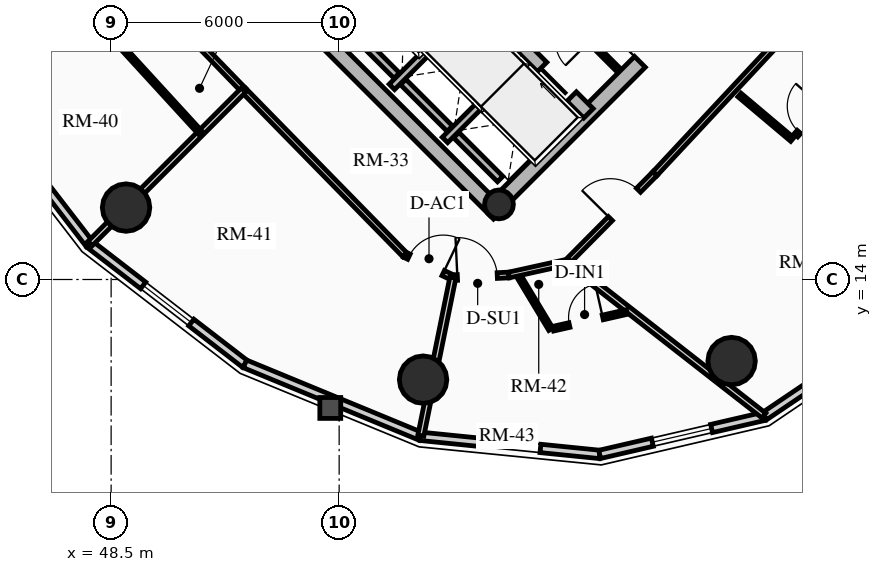
"""IFC4 building model, lengths in metres.
Left out: names, types, materials, properties, quantities, classifications, styles, units other than length and angle.
Written with IfcOpenShell. Run it as: python <this file> out.ifc"""

import sys

from ifc_helpers import new_model, si_unit, direction, frame, frame_2d, origin, origin_2d, place, context, subcontext, project, spatial, rectangle, circle, hollow_circle, extrude, source, transform, mapped, element, fill, save


model = new_model("IFC4")
c1 = context("Model", 3, precision=1e-05, world=origin(), true_north=direction((0.0, 1.0)))
c2 = subcontext(c1, "Body", "Model", "MODEL_VIEW")
j1 = project(units=[si_unit("LENGTHUNIT", "METRE"), si_unit("PLANEANGLEUNIT", "RADIAN")], contexts=[c1])
p1 = place(None, origin())
s1 = spatial("IfcSite", under=j1, at=p1, CompositionType="ELEMENT")
p2 = place(p1, origin())
s2 = spatial("IfcBuilding", under=s1, at=p2, CompositionType="ELEMENT")
p3 = place(p2, frame((0.0, 0.0, 180.7)))
s3 = spatial("IfcBuildingStorey", under=s2, at=p3, CompositionType="ELEMENT", Elevation=180.7)
p4 = place(p3, frame((58.702, 15.732, 0.0), z_axis=(0.0, 0.0, 1.0), x_axis=(-0.707106781187, 0.707106781187, 0.0)))
e1 = element("IfcWall", 1, at=p4, inside=s3, PredefinedType="SHEAR", context=c2, shape_type="SweptSolid", body=[
    extrude(rectangle(XDim=14.1, YDim=0.4, at=frame_2d((7.05, 0.0))), origin(), (0.0, 0.0, 1.0), 2.91),
])
p5 = place(p3, frame((58.561, 15.873, 0.0), z_axis=(0.0, 0.0, 1.0), x_axis=(0.707106781187, 0.707106781187, 0.0)))
e2 = element("IfcWall", 2, at=p5, inside=s3, PredefinedType="SHEAR", context=c2, shape_type="SweptSolid", body=[
    extrude(rectangle(XDim=10.7, YDim=0.4, at=frame_2d((5.35, 0.0))), origin(), (0.0, 0.0, 1.0), 2.91),
])
m1 = source(origin(), c2, "Body", "SweptSolid", [
    extrude(rectangle(XDim=1.5, YDim=2.02, at=frame_2d((0.75, 1.01))), frame((0.0, 0.21, 0.0), z_axis=(0.0, -1.0, 0.0), x_axis=(1.0, 0.0, 0.0)), (0.0, 0.0, 1.0), 0.42),
])
p6 = place(p5, frame((5.45, 0.0, 0.0)))
e3 = element("IfcOpeningElement", 3, at=p6, cuts=e2, PredefinedType="OPENING", context=c2, shape_type="MappedRepresentation", body=[
    mapped(m1, transform((0.0, 0.0, 0.0), x_axis=(1.0, 0.0, 0.0), y_axis=(0.0, 1.0, 0.0), z_axis=(0.0, 0.0, 1.0), scale=1.0)),
])
p7 = place(p3, frame((61.06, 18.373, 0.0), z_axis=(0.0, 0.0, 1.0), x_axis=(-0.707106781187, 0.707106781187, 0.0)))
e4 = element("IfcWall", 4, at=p7, inside=s3, PredefinedType="SHEAR", context=c2, shape_type="SweptSolid", body=[
    extrude(rectangle(XDim=13.7, YDim=0.35, at=frame_2d((6.85, 0.0))), origin(), (0.0, 0.0, 1.0), 2.91),
])
m2 = source(origin(), c2, "Body", "SweptSolid", [
    extrude(rectangle(XDim=1.1, YDim=2.015, at=frame_2d((0.55, 1.007))), frame((0.0, 0.185, 0.0), z_axis=(0.0, -1.0, 0.0), x_axis=(1.0, 0.0, 0.0)), (0.0, 0.0, 1.0), 0.37),
])
p8 = place(p7, frame((4.85, 0.0, 0.0)))
e5 = element("IfcOpeningElement", 5, at=p8, cuts=e4, PredefinedType="OPENING", context=c2, shape_type="MappedRepresentation", body=[
    mapped(m2, transform((0.0, 0.0, 0.0), x_axis=(1.0, 0.0, 0.0), y_axis=(0.0, 1.0, 0.0), z_axis=(0.0, 0.0, 1.0), scale=1.0)),
])
p9 = place(p7, frame((0.625, 0.0, 0.0)))
e6 = element("IfcOpeningElement", 6, at=p9, cuts=e4, PredefinedType="OPENING", context=c2, shape_type="MappedRepresentation", body=[
    mapped(m2, transform((0.0, 0.0, 0.0), x_axis=(1.0, 0.0, 0.0), y_axis=(0.0, 1.0, 0.0), z_axis=(0.0, 0.0, 1.0), scale=1.0)),
])
p10 = place(p7, frame((2.625, 0.0, 0.0)))
e7 = element("IfcOpeningElement", 7, at=p10, cuts=e4, PredefinedType="OPENING", context=c2, shape_type="MappedRepresentation", body=[
    mapped(m2, transform((0.0, 0.0, 0.0), x_axis=(1.0, 0.0, 0.0), y_axis=(0.0, 1.0, 0.0), z_axis=(0.0, 0.0, 1.0), scale=1.0)),
])
m3 = source(origin(), c2, "Body", "SweptSolid", [
    extrude(rectangle(XDim=1.15, YDim=2.02, at=frame_2d((0.575, 1.01))), frame((0.0, 0.185, 0.0), z_axis=(0.0, -1.0, 0.0), x_axis=(1.0, 0.0, 0.0)), (0.0, 0.0, 1.0), 0.37),
])
p11 = place(p7, frame((7.27, 0.0, 0.0)))
e8 = element("IfcOpeningElement", 8, at=p11, cuts=e4, PredefinedType="OPENING", context=c2, shape_type="MappedRepresentation", body=[
    mapped(m3, transform((0.0, 0.0, 0.0), x_axis=(1.0, 0.0, 0.0), y_axis=(0.0, 1.0, 0.0), z_axis=(0.0, 0.0, 1.0), scale=1.0)),
])
p12 = place(p3, frame((58.706, 15.976, 0.0), z_axis=(0.0, 0.0, 1.0), x_axis=(0.707106781187, 0.707106781187, 0.0)))
e9 = element("IfcColumn", 9, at=p12, inside=s3, PredefinedType="COLUMN", context=c2, shape_type="SweptSolid", body=[
    extrude(hollow_circle(Radius=0.38, WallThickness=0.032, at=origin_2d()), origin(), (0.0, 0.0, 1.0), 2.91),
])
for number, where, z_axis, x_axis in (
    (10, (48.893, 15.893, 0.0), (0.0, 0.0, 1.0), (1.0, 0.0, 0.0)),
    (11, (56.709, 11.365, 0.0), (0.0, 0.0, 1.0), (1.0, 0.0, 0.0)),
    (12, (64.827, 11.854, 0.0), (0.0, 0.0, 1.0), (1.0, 0.0, 0.0)),
):
    element("IfcColumn", number, at=place(p3, frame(where, z_axis=z_axis, x_axis=x_axis)), inside=s3, PredefinedType="USERDEFINED", context=c2, shape_type="SweptSolid", body=[
        extrude(circle(Radius=0.625, at=origin_2d()), origin(), (0.0, 0.0, 1.0), 2.91),
    ])
p13 = place(p3, frame((47.932, 14.932, 0.0), z_axis=(0.0, 0.0, 1.0), x_axis=(-0.610569654715, 0.791962560189, 0.0)))
e13 = element("IfcWall", 13, at=p13, inside=s3, PredefinedType="SOLIDWALL", context=c2, shape_type="SweptSolid", body=[
    extrude(rectangle(XDim=5.163, YDim=0.22, at=frame_2d((2.582, 0.0))), origin(), (0.0, 0.0, 1.0), 2.245),
])
p14 = place(p3, frame((52.021, 11.78, 0.0), z_axis=(0.0, 0.0, 1.0), x_axis=(-0.791962560189, 0.610569654715, 0.0)))
e14 = element("IfcWall", 14, at=p14, inside=s3, PredefinedType="SOLIDWALL", context=c2, shape_type="SweptSolid", body=[
    extrude(rectangle(XDim=5.163, YDim=0.22, at=frame_2d((2.582, 0.0))), origin(), (0.0, 0.0, 1.0), 2.245),
])
m4 = source(origin(), c2, "Body", "SweptSolid", [
    extrude(rectangle(XDim=1.6, YDim=1.3, at=frame_2d((0.8, 0.65))), frame((0.0, 0.12, 0.0), z_axis=(0.0, -1.0, 0.0), x_axis=(1.0, 0.0, 0.0)), (0.0, 0.0, 1.0), 0.24),
])
p15 = place(p14, frame((1.782, 0.0, 0.65)))
e15 = element("IfcOpeningElement", 15, at=p15, cuts=e14, PredefinedType="OPENING", context=c2, shape_type="MappedRepresentation", body=[
    mapped(m4, transform((0.0, 0.0, 0.0), x_axis=(1.0, 0.0, 0.0), y_axis=(0.0, 1.0, 0.0), z_axis=(0.0, 0.0, 1.0), scale=1.0)),
])
p16 = place(p3, frame((56.646, 9.873, 0.0), z_axis=(0.0, 0.0, 1.0), x_axis=(-0.924494066201, 0.381196434348, 0.0)))
e16 = element("IfcWall", 16, at=p16, inside=s3, PredefinedType="SOLIDWALL", context=c2, shape_type="SweptSolid", body=[
    extrude(rectangle(XDim=5.003, YDim=0.22, at=frame_2d((2.501, 0.0))), origin(), (0.0, 0.0, 1.0), 2.245),
])
p17 = place(p3, frame((61.355, 9.397, 0.0), z_axis=(0.0, 0.0, 1.0), x_axis=(-0.994943283129, 0.100438356004, 0.0)))
e17 = element("IfcWall", 17, at=p17, inside=s3, PredefinedType="SOLIDWALL", context=c2, shape_type="SweptSolid", body=[
    extrude(rectangle(XDim=4.733, YDim=0.22, at=frame_2d((2.366, 0.0))), origin(), (0.0, 0.0, 1.0), 2.245),
])
p18 = place(p17, frame((1.566, 0.0, 0.65)))
e18 = element("IfcOpeningElement", 18, at=p18, cuts=e17, PredefinedType="OPENING", context=c2, shape_type="MappedRepresentation", body=[
    mapped(m4, transform((0.0, 0.0, 0.0), x_axis=(1.0, 0.0, 0.0), y_axis=(0.0, 1.0, 0.0), z_axis=(0.0, 0.0, 1.0), scale=1.0)),
])
p19 = place(p3, frame((65.687, 10.4, 0.0), z_axis=(0.0, 0.0, 1.0), x_axis=(-0.97422620202, -0.22557328587, 0.0)))
e19 = element("IfcWall", 19, at=p19, inside=s3, PredefinedType="SOLIDWALL", context=c2, shape_type="SweptSolid", body=[
    extrude(rectangle(XDim=4.446, YDim=0.22, at=frame_2d((2.223, 0.0))), origin(), (0.0, 0.0, 1.0), 2.245),
])
p20 = place(p19, frame((1.423, 0.0, 0.65)))
e20 = element("IfcOpeningElement", 20, at=p20, cuts=e19, PredefinedType="OPENING", context=c2, shape_type="MappedRepresentation", body=[
    mapped(m4, transform((0.0, 0.0, 0.0), x_axis=(1.0, 0.0, 0.0), y_axis=(0.0, 1.0, 0.0), z_axis=(0.0, 0.0, 1.0), scale=1.0)),
])
p21 = place(p3, frame((69.217, 12.783, 0.0), z_axis=(0.0, 0.0, 1.0), x_axis=(-0.828817439852, -0.55951912514, 0.0)))
e21 = element("IfcWall", 21, at=p21, inside=s3, PredefinedType="SOLIDWALL", context=c2, shape_type="SweptSolid", body=[
    extrude(rectangle(XDim=4.259, YDim=0.22, at=frame_2d((2.129, 0.0))), origin(), (0.0, 0.0, 1.0), 2.245),
])
p22 = place(p3, frame((55.888, 19.069, 0.0), z_axis=(0.0, 0.0, 1.0), x_axis=(0.707106781187, 0.707106781187, 0.0)))
e22 = element("IfcWall", 22, at=p22, inside=s3, PredefinedType="SHEAR", context=c2, shape_type="SweptSolid", body=[
    extrude(rectangle(XDim=2.97, YDim=0.2, at=frame_2d((1.485, 0.0))), origin(), (0.0, 0.0, 1.0), 2.91),
])
p23 = place(p3, frame((56.015, 19.366, 0.0), z_axis=(0.0, 0.0, 1.0), x_axis=(-0.707106781187, 0.707106781187, 0.0)))
e23 = element("IfcWall", 23, at=p23, inside=s3, PredefinedType="SHEAR", context=c2, shape_type="SweptSolid", body=[
    extrude(rectangle(XDim=2.44, YDim=0.2, at=frame_2d((1.22, 0.0))), origin(), (0.0, 0.0, 1.0), 2.91),
])
p24 = place(p3, frame((57.284, 17.673, 0.0), z_axis=(0.0, 0.0, 1.0), x_axis=(0.707147878904, 0.70706568108, 0.0)))
e24 = element("IfcWall", 24, at=p24, inside=s3, PredefinedType="SHEAR", context=c2, shape_type="SweptSolid", body=[
    extrude(rectangle(XDim=2.97, YDim=0.2, at=frame_2d((1.485, 0.0))), origin(), (0.0, 0.0, 1.0), 2.91),
])
p25 = place(p3, frame((57.412, 17.97, 0.0), z_axis=(0.0, 0.0, 1.0), x_axis=(-0.707106781187, 0.707106781187, 0.0)))
e25 = element("IfcWall", 25, at=p25, inside=s3, PredefinedType="SHEAR", context=c2, shape_type="SweptSolid", body=[
    extrude(rectangle(XDim=1.735, YDim=0.2, at=frame_2d((0.867, 0.0))), origin(), (0.0, 0.0, 1.0), 2.91),
])
p26 = place(p3, frame((58.737, 16.644, 0.0), z_axis=(0.0, 0.0, 1.0), x_axis=(-0.707032117043, 0.707181437447, 0.0)))
e26 = element("IfcWall", 26, at=p26, inside=s3, PredefinedType="SHEAR", context=c2, shape_type="SweptSolid", body=[
    extrude(rectangle(XDim=1.635, YDim=0.2, at=frame_2d((0.817, 0.0))), origin(), (0.0, 0.0, 1.0), 2.91),
])
p27 = place(p3, frame((61.835, 19.529, 0.0), z_axis=(0.0, 0.0, 1.0), x_axis=(-0.707146413884, 0.707067146267, 0.0)))
e27 = element("IfcWall", 27, at=p27, inside=s3, PredefinedType="PARTITIONING", context=c2, shape_type="SweptSolid", body=[
    extrude(rectangle(XDim=3.08, YDim=0.125, at=frame_2d((1.54, 0.0))), origin(), (0.0, 0.0, 1.0), 2.675),
])
m5 = source(origin(), c2, "Body", "SweptSolid", [
    extrude(rectangle(XDim=0.9, YDim=2.005, at=frame_2d((0.45, 1.002))), frame((0.0, 0.073, 0.0), z_axis=(0.0, -1.0, 0.0), x_axis=(1.0, 0.0, 0.0)), (0.0, 0.0, 1.0), 0.145),
])
p28 = place(p27, frame((1.05, 0.0, 0.0)))
e28 = element("IfcOpeningElement", 28, at=p28, cuts=e27, PredefinedType="OPENING", context=c2, shape_type="MappedRepresentation", body=[
    mapped(m5, transform((0.0, 0.0, 0.0), x_axis=(1.0, 0.0, 0.0), y_axis=(0.0, 1.0, 0.0), z_axis=(0.0, 0.0, 1.0), scale=1.0)),
])
p29 = place(p3, frame((47.844, 23.253, 0.0), z_axis=(0.0, 0.0, 1.0), x_axis=(0.696248411352, -0.717800912293, 0.0)))
e29 = element("IfcWall", 29, at=p29, inside=s3, PredefinedType="PARTITIONING", context=c2, shape_type="SweptSolid", body=[
    extrude(rectangle(XDim=5.947, YDim=0.15, at=frame_2d((2.974, 0.0))), origin(), (0.0, 0.0, 1.0), 2.675),
])
p30 = place(p3, frame((51.985, 18.985, 0.0), z_axis=(0.0, 0.0, 1.0), x_axis=(0.699619654291, -0.714515457726, 0.0)))
e30 = element("IfcWall", 30, at=p30, inside=s3, PredefinedType="PARTITIONING", context=c2, shape_type="SweptSolid", body=[
    extrude(rectangle(XDim=6.064, YDim=0.15, at=frame_2d((3.032, 0.0))), origin(), (0.0, 0.0, 1.0), 2.245),
])
p31 = place(p3, frame((56.227, 14.652, 0.0), z_axis=(0.0, 0.0, 1.0), x_axis=(0.902364039563, -0.430974639745, 0.0)))
e31 = element("IfcWall", 31, at=p31, inside=s3, PredefinedType="PARTITIONING", context=c2, shape_type="SweptSolid", body=[
    extrude(rectangle(XDim=1.401, YDim=0.15, at=frame_2d((0.701, 0.0))), origin(), (0.0, 0.0, 1.0), 2.245),
])
m6 = source(origin(), c2, "Body", "SweptSolid", [
    extrude(rectangle(XDim=1.0, YDim=2.015, at=frame_2d((0.5, 1.007))), frame((0.0, 0.085, 0.0), z_axis=(0.0, -1.0, 0.0), x_axis=(1.0, 0.0, 0.0)), (0.0, 0.0, 1.0), 0.17),
])
p32 = place(p31, frame((0.12, 0.0, 0.0)))
e32 = element("IfcOpeningElement", 32, at=p32, cuts=e31, PredefinedType="OPENING", context=c2, shape_type="MappedRepresentation", body=[
    mapped(m6, transform((0.0, 0.0, 0.0), x_axis=(1.0, 0.0, 0.0), y_axis=(0.0, 1.0, 0.0), z_axis=(0.0, 0.0, 1.0), scale=1.0)),
])
p33 = place(p3, frame((57.492, 14.048, 0.0), z_axis=(0.0, 0.0, 1.0), x_axis=(0.99885011351, 0.047942160364, 0.0)))
e33 = element("IfcWall", 33, at=p33, inside=s3, PredefinedType="PARTITIONING", context=c2, shape_type="SweptSolid", body=[
    extrude(rectangle(XDim=1.477, YDim=0.15, at=frame_2d((0.738, 0.0))), origin(), (0.0, 0.0, 1.0), 2.245),
])
m7 = source(origin(), c2, "Body", "SweptSolid", [
    extrude(rectangle(XDim=1.05, YDim=2.015, at=frame_2d((0.525, 1.007))), frame((0.0, 0.085, 0.0), z_axis=(0.0, -1.0, 0.0), x_axis=(1.0, 0.0, 0.0)), (0.0, 0.0, 1.0), 0.17),
])
p34 = place(p33, frame((0.12, 0.0, 0.0)))
e34 = element("IfcOpeningElement", 34, at=p34, cuts=e33, PredefinedType="OPENING", context=c2, shape_type="MappedRepresentation", body=[
    mapped(m7, transform((0.0, 0.0, 0.0), x_axis=(1.0, 0.0, 0.0), y_axis=(0.0, 1.0, 0.0), z_axis=(0.0, 0.0, 1.0), scale=1.0)),
])
p35 = place(p3, frame((58.967, 14.118, 0.0), z_axis=(0.0, 0.0, 1.0), x_axis=(0.976471358036, 0.215647135235, 0.0)))
e35 = element("IfcWall", 35, at=p35, inside=s3, PredefinedType="PARTITIONING", context=c2, shape_type="SweptSolid", body=[
    extrude(rectangle(XDim=1.571, YDim=0.15, at=frame_2d((0.786, 0.0))), origin(), (0.0, 0.0, 1.0), 2.245),
])
p36 = place(p3, frame((60.501, 14.457, 0.0), z_axis=(0.0, 0.0, 1.0), x_axis=(0.704012266258, 0.710187812454, 0.0)))
e36 = element("IfcWall", 36, at=p36, inside=s3, PredefinedType="PARTITIONING", context=c2, shape_type="SweptSolid", body=[
    extrude(rectangle(XDim=3.281, YDim=0.15, at=frame_2d((1.641, 0.0))), origin(), (0.0, 0.0, 1.0), 2.245),
])
p37 = place(p36, frame((1.614, 0.0, 0.0)))
e37 = element("IfcOpeningElement", 37, at=p37, cuts=e36, PredefinedType="OPENING", context=c2, shape_type="MappedRepresentation", body=[
    mapped(m7, transform((0.0, 0.0, 0.0), x_axis=(1.0, 0.0, 0.0), y_axis=(0.0, 1.0, 0.0), z_axis=(0.0, 0.0, 1.0), scale=1.0)),
])
p38 = place(p3, frame((62.812, 16.788, 0.0), z_axis=(0.0, 0.0, 1.0), x_axis=(0.682323555485, 0.731050316757, 0.0)))
e38 = element("IfcWall", 38, at=p38, inside=s3, PredefinedType="PARTITIONING", context=c2, shape_type="SweptSolid", body=[
    extrude(rectangle(XDim=6.559, YDim=0.15, at=frame_2d((3.279, 0.0))), origin(), (0.0, 0.0, 1.0), 2.245),
])
p39 = place(p3, frame((51.985, 18.985, 0.0), z_axis=(0.0, 0.0, 1.0), x_axis=(-0.707106781187, -0.707106781187, 0.0)))
e39 = element("IfcWall", 39, at=p39, inside=s3, PredefinedType="PARTITIONING", context=c2, shape_type="SweptSolid", body=[
    extrude(rectangle(XDim=5.711, YDim=0.16, at=frame_2d((2.855, 0.0))), origin(), (0.0, 0.0, 1.0), 2.245),
])
p40 = place(p3, frame((57.492, 14.048, 0.0), z_axis=(0.0, 0.0, 1.0), x_axis=(-0.198717737532, -0.980056764065, 0.0)))
e40 = element("IfcWall", 40, at=p40, inside=s3, PredefinedType="PARTITIONING", context=c2, shape_type="SweptSolid", body=[
    extrude(rectangle(XDim=4.24, YDim=0.16, at=frame_2d((2.12, 0.0))), origin(), (0.0, 0.0, 1.0), 2.245),
])
p41 = place(p3, frame((60.501, 14.457, 0.0), z_axis=(0.0, 0.0, 1.0), x_axis=(0.788354052705, -0.61522181982, 0.0)))
e41 = element("IfcWall", 41, at=p41, inside=s3, PredefinedType="PARTITIONING", context=c2, shape_type="SweptSolid", body=[
    extrude(rectangle(XDim=6.566, YDim=0.16, at=frame_2d((3.283, 0.0))), origin(), (0.0, 0.0, 1.0), 2.245),
])
p42 = place(p3, frame((46.991, 22.071, 0.0), z_axis=(0.0, 0.0, 1.0), x_axis=(0.675455872419, -0.737400409828, 0.0)))
e42 = element("IfcWall", 42, at=p42, inside=s3, PredefinedType="PARTITIONING", context=c2, shape_type="SweptSolid", body=[
    extrude(rectangle(XDim=5.719, YDim=0.125, at=frame_2d((2.859, 0.0))), origin(), (0.0, 0.0, 1.0), 2.675),
])
p43 = place(p3, frame((59.265, 14.028, 0.0), z_axis=(0.0, 0.0, 1.0), x_axis=(0.515875690436, -0.856663453181, 0.0)))
e43 = element("IfcWall", 43, at=p43, inside=s3, PredefinedType="PARTITIONING", context=c2, shape_type="SweptSolid", body=[
    extrude(rectangle(XDim=1.56, YDim=0.125, at=frame_2d((0.78, 0.0))), origin(), (0.0, 0.0, 1.0), 2.245),
])
p44 = place(p3, frame((60.131, 12.705, 0.0), z_axis=(0.0, 0.0, 1.0), x_axis=(0.975184609806, 0.221393262767, 0.0)))
e44 = element("IfcWall", 44, at=p44, inside=s3, PredefinedType="PARTITIONING", context=c2, shape_type="SweptSolid", body=[
    extrude(rectangle(XDim=1.991, YDim=0.125, at=frame_2d((0.996, 0.0))), origin(), (0.0, 0.0, 1.0), 2.675),
])
p45 = place(p44, frame((0.439, 0.0, 0.0)))
e45 = element("IfcOpeningElement", 45, at=p45, cuts=e44, PredefinedType="OPENING", context=c2, shape_type="MappedRepresentation", body=[
    mapped(m5, transform((0.0, 0.0, 0.0), x_axis=(1.0, 0.0, 0.0), y_axis=(0.0, 1.0, 0.0), z_axis=(0.0, 0.0, 1.0), scale=1.0)),
])
p46 = place(p3, frame((65.033, 18.856, 0.0), z_axis=(0.0, 0.0, 1.0), x_axis=(0.764632588969, -0.644466449, 0.0)))
e46 = element("IfcWall", 46, at=p46, inside=s3, PredefinedType="PARTITIONING", context=c2, shape_type="SweptSolid", body=[
    extrude(rectangle(XDim=1.818, YDim=0.125, at=frame_2d((0.909, 0.0))), origin(), (0.0, 0.0, 1.0), 2.675),
])
p47 = place(p3, frame((66.52, 17.795, 0.0), z_axis=(0.0, 0.0, 1.0), x_axis=(0.658266024679, 0.752785388244, 0.0)))
e47 = element("IfcWall", 47, at=p47, inside=s3, PredefinedType="PARTITIONING", context=c2, shape_type="SweptSolid", body=[
    extrude(rectangle(XDim=2.826, YDim=0.125, at=frame_2d((1.413, 0.0))), origin(), (0.0, 0.0, 1.0), 2.245),
])
p48 = place(p47, frame((0.12, 0.0, 0.0)))
e48 = element("IfcOpeningElement", 48, at=p48, cuts=e47, PredefinedType="OPENING", context=c2, shape_type="MappedRepresentation", body=[
    mapped(m5, transform((0.0, 0.0, 0.0), x_axis=(1.0, 0.0, 0.0), y_axis=(0.0, 1.0, 0.0), z_axis=(0.0, 0.0, 1.0), scale=1.0)),
])
m8 = source(origin(), c2, "Body", "SweptSolid", [
    extrude(rectangle(XDim=1.6, YDim=1.3, at=frame_2d((0.8, 0.65))), frame((0.0, 0.03, 0.0), z_axis=(0.0, -1.0, 0.0), x_axis=(1.0, 0.0, 0.0)), (0.0, 0.0, 1.0), 0.06),
])
p49 = place(p15, origin())
e49 = element("IfcWindow", 49, at=p49, inside=s3, PartitioningType="SINGLE_PANEL", PredefinedType="WINDOW", context=c2, shape_type="MappedRepresentation", body=[
    mapped(m8, transform((0.0, 0.0, 0.0), x_axis=(1.0, 0.0, 0.0), y_axis=(0.0, 1.0, 0.0), z_axis=(0.0, 0.0, 1.0), scale=1.0)),
])
fill(e15, e49)
p50 = place(p18, origin())
e50 = element("IfcWindow", 50, at=p50, inside=s3, PartitioningType="SINGLE_PANEL", PredefinedType="WINDOW", context=c2, shape_type="MappedRepresentation", body=[
    mapped(m8, transform((0.0, 0.0, 0.0), x_axis=(1.0, 0.0, 0.0), y_axis=(0.0, 1.0, 0.0), z_axis=(0.0, 0.0, 1.0), scale=1.0)),
])
fill(e18, e50)
p51 = place(p20, origin())
e51 = element("IfcWindow", 51, at=p51, inside=s3, PartitioningType="SINGLE_PANEL", PredefinedType="WINDOW", context=c2, shape_type="MappedRepresentation", body=[
    mapped(m8, transform((0.0, 0.0, 0.0), x_axis=(1.0, 0.0, 0.0), y_axis=(0.0, 1.0, 0.0), z_axis=(0.0, 0.0, 1.0), scale=1.0)),
])
fill(e20, e51)
m9 = source(origin(), c2, "Body", "SweptSolid", [
    extrude(rectangle(XDim=1.1, YDim=2.015, at=frame_2d((0.55, 1.007))), frame((0.0, 0.025, 0.0), z_axis=(0.0, -1.0, 0.0), x_axis=(1.0, 0.0, 0.0)), (0.0, 0.0, 1.0), 0.05),
])
p52 = place(p9, origin())
e52 = element("IfcDoor", 52, at=p52, inside=s3, OperationType="SLIDING_TO_RIGHT", PredefinedType="DOOR", context=c2, shape_type="MappedRepresentation", body=[
    mapped(m9, transform((0.0, 0.0, 0.0), x_axis=(1.0, 0.0, 0.0), y_axis=(0.0, 1.0, 0.0), z_axis=(0.0, 0.0, 1.0), scale=1.0)),
])
fill(e6, e52)
m10 = source(origin(), c2, "Body", "SweptSolid", [
    extrude(rectangle(XDim=1.5, YDim=2.02, at=frame_2d((0.75, 1.01))), frame((0.0, 0.025, 0.0), z_axis=(0.0, -1.0, 0.0), x_axis=(1.0, 0.0, 0.0)), (0.0, 0.0, 1.0), 0.05),
])
p53 = place(p6, origin())
e53 = element("IfcDoor", 53, at=p53, inside=s3, OperationType="DOUBLE_DOOR_SINGLE_SWING", PredefinedType="DOOR", context=c2, shape_type="MappedRepresentation", body=[
    mapped(m10, transform((0.0, 0.0, 0.0), x_axis=(1.0, 0.0, 0.0), y_axis=(0.0, 1.0, 0.0), z_axis=(0.0, 0.0, 1.0), scale=1.0)),
])
fill(e3, e53)
m11 = source(origin(), c2, "Body", "SweptSolid", [
    extrude(rectangle(XDim=1.0, YDim=2.015, at=frame_2d((0.5, 1.007))), frame((0.0, 0.025, 0.0), z_axis=(0.0, -1.0, 0.0), x_axis=(1.0, 0.0, 0.0)), (0.0, 0.0, 1.0), 0.05),
])
p54 = place(p32, origin())
e54 = element("IfcDoor", 54, at=p54, inside=s3, OperationType="SINGLE_SWING_RIGHT", PredefinedType="DOOR", context=c2, shape_type="MappedRepresentation", body=[
    mapped(m11, transform((0.0, 0.0, 0.0), x_axis=(1.0, 0.0, 0.0), y_axis=(0.0, 1.0, 0.0), z_axis=(0.0, 0.0, 1.0), scale=1.0)),
])
fill(e32, e54)
m12 = source(origin(), c2, "Body", "SweptSolid", [
    extrude(rectangle(XDim=1.05, YDim=2.015, at=frame_2d((0.525, 1.007))), frame((0.0, 0.025, 0.0), z_axis=(0.0, -1.0, 0.0), x_axis=(1.0, 0.0, 0.0)), (0.0, 0.0, 1.0), 0.05),
])
p55 = place(p34, origin())
e55 = element("IfcDoor", 55, at=p55, inside=s3, OperationType="SINGLE_SWING_LEFT", PredefinedType="DOOR", context=c2, shape_type="MappedRepresentation", body=[
    mapped(m12, transform((0.0, 0.0, 0.0), x_axis=(1.0, 0.0, 0.0), y_axis=(0.0, 1.0, 0.0), z_axis=(0.0, 0.0, 1.0), scale=1.0)),
])
fill(e34, e55)
m13 = source(origin(), c2, "Body", "SweptSolid", [
    extrude(rectangle(XDim=0.9, YDim=2.005, at=frame_2d((0.45, 1.002))), frame((0.0, 0.025, 0.0), z_axis=(0.0, -1.0, 0.0), x_axis=(1.0, 0.0, 0.0)), (0.0, 0.0, 1.0), 0.05),
])
p56 = place(p45, origin())
e56 = element("IfcDoor", 56, at=p56, inside=s3, OperationType="SINGLE_SWING_RIGHT", PredefinedType="DOOR", context=c2, shape_type="MappedRepresentation", body=[
    mapped(m13, transform((0.0, 0.0, 0.0), x_axis=(1.0, 0.0, 0.0), y_axis=(0.0, 1.0, 0.0), z_axis=(0.0, 0.0, 1.0), scale=1.0)),
])
fill(e45, e56)
p57 = place(p37, origin())
e57 = element("IfcDoor", 57, at=p57, inside=s3, OperationType="SINGLE_SWING_LEFT", PredefinedType="DOOR", context=c2, shape_type="MappedRepresentation", body=[
    mapped(m12, transform((0.0, 0.0, 0.0), x_axis=(1.0, 0.0, 0.0), y_axis=(0.0, 1.0, 0.0), z_axis=(0.0, 0.0, 1.0), scale=1.0)),
])
fill(e37, e57)
p58 = place(p48, origin())
e58 = element("IfcDoor", 58, at=p58, inside=s3, OperationType="SINGLE_SWING_RIGHT", PredefinedType="DOOR", context=c2, shape_type="MappedRepresentation", body=[
    mapped(m13, transform((0.0, 0.0, 0.0), x_axis=(1.0, 0.0, 0.0), y_axis=(0.0, 1.0, 0.0), z_axis=(0.0, 0.0, 1.0), scale=1.0)),
])
fill(e48, e58)
save(model, sys.argv[1])
